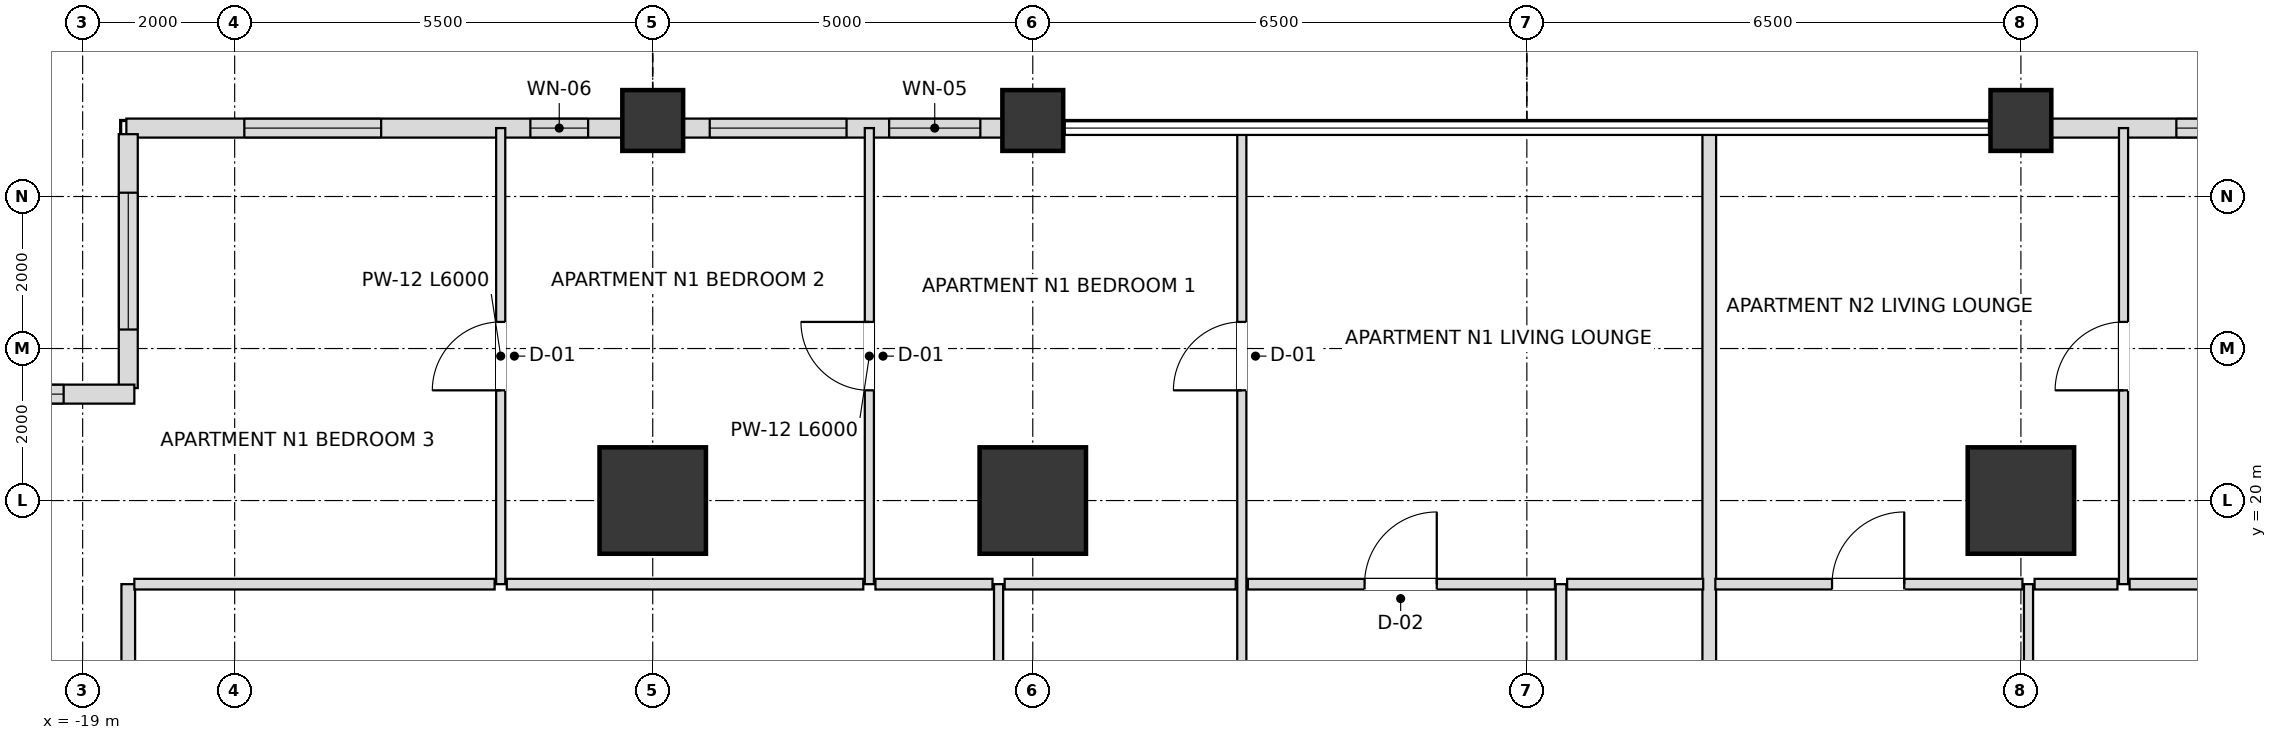
"""IFC4 building model, lengths in metres.
Left out: names, types, materials, properties, quantities, classifications, styles, units other than length and angle.
Written with IfcOpenShell. Run it as: python <this file> out.ifc"""

import sys

from ifc_helpers import new_model, si_unit, direction, frame, frame_2d, origin, origin_2d, place, context, subcontext, project, spatial, rectangle, extrude, element, fill, save


model = new_model("IFC4")
c1 = context("Model", 3, precision=1e-05, world=origin(), true_north=direction((0.0, 1.0)))
c2 = subcontext(c1, "Body", "Model", "MODEL_VIEW")
j1 = project(units=[si_unit("LENGTHUNIT", "METRE"), si_unit("PLANEANGLEUNIT", "RADIAN")], contexts=[c1])
p1 = place(None, origin())
s1 = spatial("IfcSite", under=j1, at=p1, CompositionType="ELEMENT")
p2 = place(p1, origin())
s2 = spatial("IfcBuilding", under=s1, at=p2, CompositionType="ELEMENT")
p3 = place(p2, frame((0.0, 0.0, 61.2)))
s3 = spatial("IfcBuildingStorey", under=s2, at=p3, CompositionType="ELEMENT", Elevation=61.2)
for number, where, z_axis, x_axis in (
    (1, (6.5, 20.0, 0.0), (0.0, 0.0, 1.0), (1.0, 0.0, 0.0)),
    (2, (-6.5, 20.0, 0.0), (0.0, 0.0, 1.0), (1.0, 0.0, 0.0)),
    (3, (-11.5, 20.0, 0.0), (0.0, 0.0, 1.0), (1.0, 0.0, 0.0)),
):
    element("IfcColumn", number, at=place(p3, frame(where, z_axis=z_axis, x_axis=x_axis)), inside=s3, PredefinedType="USERDEFINED", context=c2, shape_type="SweptSolid", body=[
        extrude(rectangle(XDim=1.4, YDim=1.4, at=origin_2d()), origin(), (0.0, 0.0, 1.0), 3.6),
    ])
for number, where, z_axis, x_axis in (
    (4, (-11.5, 25.0, 0.0), (0.0, 0.0, 1.0), (1.0, 0.0, 0.0)),
    (5, (-6.5, 25.0, 0.0), (0.0, 0.0, 1.0), (1.0, 0.0, 0.0)),
    (6, (6.5, 25.0, 0.0), (0.0, 0.0, 1.0), (1.0, 0.0, 0.0)),
):
    element("IfcColumn", number, at=place(p3, frame(where, z_axis=z_axis, x_axis=x_axis)), inside=s3, PredefinedType="COLUMN", context=c2, shape_type="SweptSolid", body=[
        extrude(rectangle(XDim=0.8, YDim=0.8, at=origin_2d()), origin(), (0.0, 0.0, 1.0), 3.6),
    ])
p4 = place(p3, frame((11.105, 24.9, 0.0), z_axis=(0.0, 0.0, 1.0), x_axis=(-1.0, 0.0, 0.0)))
e7 = element("IfcWall", 7, at=p4, inside=s3, PredefinedType="SOLIDWALL", context=c2, shape_type="SweptSolid", body=[
    extrude(rectangle(XDim=4.21, YDim=0.25, at=frame_2d((2.105, 0.0))), origin(), (0.0, 0.0, 1.0), 2.736),
])
p5 = place(p4, frame((0.76, 0.0, 0.72)))
e8 = element("IfcOpeningElement", 8, at=p5, cuts=e7, PredefinedType="OPENING", context=c2, shape_type="SweptSolid", body=[
    extrude(rectangle(XDim=1.8, YDim=1.68, at=frame_2d((0.9, 0.84))), frame((0.0, 0.135, 0.0), z_axis=(0.0, -1.0, 0.0), x_axis=(1.0, 0.0, 0.0)), (0.0, 0.0, 1.0), 0.27),
])
p6 = place(p3, frame((-6.895, 24.9, 0.0), z_axis=(0.0, 0.0, 1.0), x_axis=(-1.0, 0.0, 0.0)))
e9 = element("IfcWall", 9, at=p6, inside=s3, PredefinedType="SOLIDWALL", context=c2, shape_type="SweptSolid", body=[
    extrude(rectangle(XDim=4.21, YDim=0.25, at=frame_2d((2.105, 0.0))), origin(), (0.0, 0.0, 1.0), 2.736),
])
p7 = place(p6, frame((0.295, 0.0, 0.72)))
e10 = element("IfcOpeningElement", 10, at=p7, cuts=e9, PredefinedType="OPENING", context=c2, shape_type="SweptSolid", body=[
    extrude(rectangle(XDim=1.2, YDim=1.68, at=frame_2d((0.6, 0.84))), frame((0.0, 0.135, 0.0), z_axis=(0.0, -1.0, 0.0), x_axis=(1.0, 0.0, 0.0)), (0.0, 0.0, 1.0), 0.27),
])
p8 = place(p6, frame((2.055, 0.0, 0.72)))
e11 = element("IfcOpeningElement", 11, at=p8, cuts=e9, PredefinedType="OPENING", context=c2, shape_type="SweptSolid", body=[
    extrude(rectangle(XDim=1.8, YDim=1.68, at=frame_2d((0.9, 0.84))), frame((0.0, 0.135, 0.0), z_axis=(0.0, -1.0, 0.0), x_axis=(1.0, 0.0, 0.0)), (0.0, 0.0, 1.0), 0.27),
])
p9 = place(p3, frame((-11.895, 24.9, 0.0), z_axis=(0.0, 0.0, 1.0), x_axis=(-1.0, 0.0, 0.0)))
e12 = element("IfcWall", 12, at=p9, inside=s3, PredefinedType="SOLIDWALL", context=c2, shape_type="SweptSolid", body=[
    extrude(rectangle(XDim=6.53, YDim=0.25, at=frame_2d((3.265, 0.0))), origin(), (0.0, 0.0, 1.0), 2.736),
])
p10 = place(p9, frame((0.455, 0.0, 0.72)))
e13 = element("IfcOpeningElement", 13, at=p10, cuts=e12, PredefinedType="OPENING", context=c2, shape_type="SweptSolid", body=[
    extrude(rectangle(XDim=0.76, YDim=1.68, at=frame_2d((0.38, 0.84))), frame((0.0, 0.135, 0.0), z_axis=(0.0, -1.0, 0.0), x_axis=(1.0, 0.0, 0.0)), (0.0, 0.0, 1.0), 0.27),
])
p11 = place(p9, frame((3.178, 0.0, 0.72)))
e14 = element("IfcOpeningElement", 14, at=p11, cuts=e12, PredefinedType="OPENING", context=c2, shape_type="SweptSolid", body=[
    extrude(rectangle(XDim=1.8, YDim=1.68, at=frame_2d((0.9, 0.84))), frame((0.0, 0.135, 0.0), z_axis=(0.0, -1.0, 0.0), x_axis=(1.0, 0.0, 0.0)), (0.0, 0.0, 1.0), 0.27),
])
p12 = place(p3, frame((-18.4, 24.82, 0.0), z_axis=(0.0, 0.0, 1.0), x_axis=(0.0, -1.0, 0.0)))
e15 = element("IfcWall", 15, at=p12, inside=s3, PredefinedType="SOLIDWALL", context=c2, shape_type="SweptSolid", body=[
    extrude(rectangle(XDim=3.34, YDim=0.25, at=frame_2d((1.67, 0.0))), origin(), (0.0, 0.0, 1.0), 2.736),
])
p13 = place(p12, frame((0.77, 0.0, 0.72)))
e16 = element("IfcOpeningElement", 16, at=p13, cuts=e15, PredefinedType="OPENING", context=c2, shape_type="SweptSolid", body=[
    extrude(rectangle(XDim=1.8, YDim=1.68, at=frame_2d((0.9, 0.84))), frame((0.0, 0.135, 0.0), z_axis=(0.0, -1.0, 0.0), x_axis=(1.0, 0.0, 0.0)), (0.0, 0.0, 1.0), 0.27),
])
p14 = place(p3, frame((-18.32, 21.4, 0.0), z_axis=(0.0, 0.0, 1.0), x_axis=(-1.0, 0.0, 0.0)))
e17 = element("IfcWall", 17, at=p14, inside=s3, PredefinedType="SOLIDWALL", context=c2, shape_type="SweptSolid", body=[
    extrude(rectangle(XDim=3.66, YDim=0.25, at=frame_2d((1.83, 0.0))), origin(), (0.0, 0.0, 1.0), 2.736),
])
p15 = place(p14, frame((0.93, 0.0, 0.72)))
e18 = element("IfcOpeningElement", 18, at=p15, cuts=e17, PredefinedType="OPENING", context=c2, shape_type="SweptSolid", body=[
    extrude(rectangle(XDim=1.8, YDim=1.68, at=frame_2d((0.9, 0.84))), frame((0.0, 0.135, 0.0), z_axis=(0.0, -1.0, 0.0), x_axis=(1.0, 0.0, 0.0)), (0.0, 0.0, 1.0), 0.27),
])
p16 = place(p3, frame((-18.4, 9.3, 0.0), z_axis=(0.0, 0.0, 1.0), x_axis=(0.0, 1.0, 0.0)))
e19 = element("IfcWall", 19, at=p16, inside=s3, PredefinedType="PARTITIONING", context=c2, shape_type="SweptSolid", body=[
    extrude(rectangle(XDim=9.6, YDim=0.18, at=frame_2d((4.8, 0.0))), origin(), (0.0, 0.0, 1.0), 2.736),
])
p17 = place(p3, frame((-13.5, 18.9, 0.0), z_axis=(0.0, 0.0, 1.0), x_axis=(0.0, 1.0, 0.0)))
e20 = element("IfcWall", 20, at=p17, inside=s3, PredefinedType="PARTITIONING", context=c2, shape_type="SweptSolid", body=[
    extrude(rectangle(XDim=6.0, YDim=0.12, at=frame_2d((3.0, 0.0))), origin(), (0.0, 0.0, 1.0), 2.736),
])
p18 = place(p17, frame((2.55, 0.0, 0.0)))
e21 = element("IfcOpeningElement", 21, at=p18, cuts=e20, PredefinedType="OPENING", context=c2, shape_type="SweptSolid", body=[
    extrude(rectangle(XDim=0.9, YDim=2.1, at=frame_2d((0.45, 1.05))), frame((0.0, 0.07, 0.0), z_axis=(0.0, -1.0, 0.0), x_axis=(1.0, 0.0, 0.0)), (0.0, 0.0, 1.0), 0.14),
])
p19 = place(p3, frame((-8.65, 18.9, 0.0), z_axis=(0.0, 0.0, 1.0), x_axis=(0.0, 1.0, 0.0)))
e22 = element("IfcWall", 22, at=p19, inside=s3, PredefinedType="PARTITIONING", context=c2, shape_type="SweptSolid", body=[
    extrude(rectangle(XDim=6.0, YDim=0.12, at=frame_2d((3.0, 0.0))), origin(), (0.0, 0.0, 1.0), 2.816),
])
p20 = place(p19, frame((2.55, 0.0, 0.0)))
e23 = element("IfcOpeningElement", 23, at=p20, cuts=e22, PredefinedType="OPENING", context=c2, shape_type="SweptSolid", body=[
    extrude(rectangle(XDim=0.9, YDim=2.1, at=frame_2d((0.45, 1.05))), frame((0.0, 0.07, 0.0), z_axis=(0.0, -1.0, 0.0), x_axis=(1.0, 0.0, 0.0)), (0.0, 0.0, 1.0), 0.14),
])
p21 = place(p3, frame((-6.95, 9.3, 0.0), z_axis=(0.0, 0.0, 1.0), x_axis=(0.0, 1.0, 0.0)))
e24 = element("IfcWall", 24, at=p21, inside=s3, PredefinedType="PARTITIONING", context=c2, shape_type="SweptSolid", body=[
    extrude(rectangle(XDim=9.6, YDim=0.12, at=frame_2d((4.8, 0.0))), origin(), (0.0, 0.0, 1.0), 2.816),
])
p22 = place(p21, frame((4.35, 0.0, 0.0)))
e25 = element("IfcOpeningElement", 25, at=p22, cuts=e24, PredefinedType="OPENING", context=c2, shape_type="SweptSolid", body=[
    extrude(rectangle(XDim=0.9, YDim=2.1, at=frame_2d((0.45, 1.05))), frame((0.0, 0.07, 0.0), z_axis=(0.0, -1.0, 0.0), x_axis=(1.0, 0.0, 0.0)), (0.0, 0.0, 1.0), 0.14),
])
p23 = place(p3, frame((-3.75, 9.3, 0.0), z_axis=(0.0, 0.0, 1.0), x_axis=(0.0, 1.0, 0.0)))
e26 = element("IfcWall", 26, at=p23, inside=s3, PredefinedType="PARTITIONING", context=c2, shape_type="SweptSolid", body=[
    extrude(rectangle(XDim=15.6, YDim=0.12, at=frame_2d((7.8, 0.0))), origin(), (0.0, 0.0, 1.0), 2.816),
])
p24 = place(p23, frame((4.325, 0.0, 0.0)))
e27 = element("IfcOpeningElement", 27, at=p24, cuts=e26, PredefinedType="OPENING", context=c2, shape_type="SweptSolid", body=[
    extrude(rectangle(XDim=0.95, YDim=2.1, at=frame_2d((0.475, 1.05))), frame((0.0, 0.07, 0.0), z_axis=(0.0, -1.0, 0.0), x_axis=(1.0, 0.0, 0.0)), (0.0, 0.0, 1.0), 0.14),
])
p25 = place(p23, frame((12.15, 0.0, 0.0)))
e28 = element("IfcOpeningElement", 28, at=p25, cuts=e26, PredefinedType="OPENING", context=c2, shape_type="SweptSolid", body=[
    extrude(rectangle(XDim=0.9, YDim=2.1, at=frame_2d((0.45, 1.05))), frame((0.0, 0.07, 0.0), z_axis=(0.0, -1.0, 0.0), x_axis=(1.0, 0.0, 0.0)), (0.0, 0.0, 1.0), 0.14),
])
p26 = place(p3, frame((0.45, 9.3, 0.0), z_axis=(0.0, 0.0, 1.0), x_axis=(0.0, 1.0, 0.0)))
e29 = element("IfcWall", 29, at=p26, inside=s3, PredefinedType="PARTITIONING", context=c2, shape_type="SweptSolid", body=[
    extrude(rectangle(XDim=9.6, YDim=0.14, at=frame_2d((4.8, 0.0))), origin(), (0.0, 0.0, 1.0), 2.948),
])
p27 = place(p26, frame((4.35, 0.0, 0.0)))
e30 = element("IfcOpeningElement", 30, at=p27, cuts=e29, PredefinedType="OPENING", context=c2, shape_type="SweptSolid", body=[
    extrude(rectangle(XDim=0.9, YDim=2.1, at=frame_2d((0.45, 1.05))), frame((0.0, 0.08, 0.0), z_axis=(0.0, -1.0, 0.0), x_axis=(1.0, 0.0, 0.0)), (0.0, 0.0, 1.0), 0.16),
])
p28 = place(p3, frame((2.4, 9.3, 0.0), z_axis=(0.0, 0.0, 1.0), x_axis=(0.0, 1.0, 0.0)))
e31 = element("IfcWall", 31, at=p28, inside=s3, PredefinedType="PARTITIONING", context=c2, shape_type="SweptSolid", body=[
    extrude(rectangle(XDim=15.6, YDim=0.18, at=frame_2d((7.8, 0.0))), origin(), (0.0, 0.0, 1.0), 2.816),
])
p29 = place(p3, frame((6.6, 9.3, 0.0), z_axis=(0.0, 0.0, 1.0), x_axis=(0.0, 1.0, 0.0)))
e32 = element("IfcWall", 32, at=p29, inside=s3, PredefinedType="PARTITIONING", context=c2, shape_type="SweptSolid", body=[
    extrude(rectangle(XDim=9.6, YDim=0.12, at=frame_2d((4.8, 0.0))), origin(), (0.0, 0.0, 1.0), 2.816),
])
p30 = place(p29, frame((4.325, 0.0, 0.0)))
e33 = element("IfcOpeningElement", 33, at=p30, cuts=e32, PredefinedType="OPENING", context=c2, shape_type="SweptSolid", body=[
    extrude(rectangle(XDim=0.95, YDim=2.1, at=frame_2d((0.475, 1.05))), frame((0.0, 0.07, 0.0), z_axis=(0.0, -1.0, 0.0), x_axis=(1.0, 0.0, 0.0)), (0.0, 0.0, 1.0), 0.14),
])
p31 = place(p3, frame((7.85, 18.9, 0.0), z_axis=(0.0, 0.0, 1.0), x_axis=(0.0, 1.0, 0.0)))
e34 = element("IfcWall", 34, at=p31, inside=s3, PredefinedType="PARTITIONING", context=c2, shape_type="SweptSolid", body=[
    extrude(rectangle(XDim=6.0, YDim=0.12, at=frame_2d((3.0, 0.0))), origin(), (0.0, 0.0, 1.0), 2.816),
])
p32 = place(p31, frame((2.55, 0.0, 0.0)))
e35 = element("IfcOpeningElement", 35, at=p32, cuts=e34, PredefinedType="OPENING", context=c2, shape_type="SweptSolid", body=[
    extrude(rectangle(XDim=0.9, YDim=2.1, at=frame_2d((0.45, 1.05))), frame((0.0, 0.07, 0.0), z_axis=(0.0, -1.0, 0.0), x_axis=(1.0, 0.0, 0.0)), (0.0, 0.0, 1.0), 0.14),
])
p33 = place(p3, frame((-18.32, 18.9, 0.0), z_axis=(0.0, 0.0, 1.0), x_axis=(1.0, 0.0, 0.0)))
e36 = element("IfcWall", 36, at=p33, inside=s3, PredefinedType="PARTITIONING", context=c2, shape_type="SweptSolid", body=[
    extrude(rectangle(XDim=4.74, YDim=0.14, at=frame_2d((2.37, 0.0))), origin(), (0.0, 0.0, 1.0), 2.736),
])
p34 = place(p3, frame((-13.42, 18.9, 0.0), z_axis=(0.0, 0.0, 1.0), x_axis=(1.0, 0.0, 0.0)))
e37 = element("IfcWall", 37, at=p34, inside=s3, PredefinedType="PARTITIONING", context=c2, shape_type="SweptSolid", body=[
    extrude(rectangle(XDim=4.69, YDim=0.14, at=frame_2d((2.345, 0.0))), origin(), (0.0, 0.0, 1.0), 2.736),
])
p35 = place(p3, frame((-8.57, 18.9, 0.0), z_axis=(0.0, 0.0, 1.0), x_axis=(1.0, 0.0, 0.0)))
e38 = element("IfcWall", 38, at=p35, inside=s3, PredefinedType="PARTITIONING", context=c2, shape_type="SweptSolid", body=[
    extrude(rectangle(XDim=1.54, YDim=0.14, at=frame_2d((0.77, 0.0))), origin(), (0.0, 0.0, 1.0), 3.38),
])
p36 = place(p3, frame((-6.87, 18.9, 0.0), z_axis=(0.0, 0.0, 1.0), x_axis=(1.0, 0.0, 0.0)))
e39 = element("IfcWall", 39, at=p36, inside=s3, PredefinedType="PARTITIONING", context=c2, shape_type="SweptSolid", body=[
    extrude(rectangle(XDim=3.04, YDim=0.14, at=frame_2d((1.52, 0.0))), origin(), (0.0, 0.0, 1.0), 2.816),
])
p37 = place(p3, frame((-3.67, 18.9, 0.0), z_axis=(0.0, 0.0, 1.0), x_axis=(1.0, 0.0, 0.0)))
e40 = element("IfcWall", 40, at=p37, inside=s3, PredefinedType="PARTITIONING", context=c2, shape_type="SweptSolid", body=[
    extrude(rectangle(XDim=4.04, YDim=0.14, at=frame_2d((2.02, 0.0))), origin(), (0.0, 0.0, 1.0), 3.38),
])
p38 = place(p37, frame((1.535, 0.0, 0.0)))
e41 = element("IfcOpeningElement", 41, at=p38, cuts=e40, PredefinedType="OPENING", context=c2, shape_type="SweptSolid", body=[
    extrude(rectangle(XDim=0.95, YDim=2.1, at=frame_2d((0.475, 1.05))), frame((0.0, 0.08, 0.0), z_axis=(0.0, -1.0, 0.0), x_axis=(1.0, 0.0, 0.0)), (0.0, 0.0, 1.0), 0.16),
])
p39 = place(p3, frame((0.53, 18.9, 0.0), z_axis=(0.0, 0.0, 1.0), x_axis=(1.0, 0.0, 0.0)))
e42 = element("IfcWall", 42, at=p39, inside=s3, PredefinedType="PARTITIONING", context=c2, shape_type="SweptSolid", body=[
    extrude(rectangle(XDim=1.79, YDim=0.14, at=frame_2d((0.895, 0.0))), origin(), (0.0, 0.0, 1.0), 3.38),
])
p40 = place(p3, frame((2.48, 18.9, 0.0), z_axis=(0.0, 0.0, 1.0), x_axis=(1.0, 0.0, 0.0)))
e43 = element("IfcWall", 43, at=p40, inside=s3, PredefinedType="PARTITIONING", context=c2, shape_type="SweptSolid", body=[
    extrude(rectangle(XDim=4.04, YDim=0.14, at=frame_2d((2.02, 0.0))), origin(), (0.0, 0.0, 1.0), 3.38),
])
p41 = place(p40, frame((1.535, 0.0, 0.0)))
e44 = element("IfcOpeningElement", 44, at=p41, cuts=e43, PredefinedType="OPENING", context=c2, shape_type="SweptSolid", body=[
    extrude(rectangle(XDim=0.95, YDim=2.1, at=frame_2d((0.475, 1.05))), frame((0.0, 0.08, 0.0), z_axis=(0.0, -1.0, 0.0), x_axis=(1.0, 0.0, 0.0)), (0.0, 0.0, 1.0), 0.16),
])
p42 = place(p3, frame((6.68, 18.9, 0.0), z_axis=(0.0, 0.0, 1.0), x_axis=(1.0, 0.0, 0.0)))
e45 = element("IfcWall", 45, at=p42, inside=s3, PredefinedType="PARTITIONING", context=c2, shape_type="SweptSolid", body=[
    extrude(rectangle(XDim=1.09, YDim=0.14, at=frame_2d((0.545, 0.0))), origin(), (0.0, 0.0, 1.0), 3.38),
])
p43 = place(p3, frame((7.93, 18.9, 0.0), z_axis=(0.0, 0.0, 1.0), x_axis=(1.0, 0.0, 0.0)))
e46 = element("IfcWall", 46, at=p43, inside=s3, PredefinedType="PARTITIONING", context=c2, shape_type="SweptSolid", body=[
    extrude(rectangle(XDim=1.79, YDim=0.14, at=frame_2d((0.895, 0.0))), origin(), (0.0, 0.0, 1.0), 3.38),
])
p44 = place(p5, origin())
e47 = element("IfcWindow", 47, at=p44, inside=s3, PartitioningType="SINGLE_PANEL", PredefinedType="WINDOW", context=c2, shape_type="SweptSolid", body=[
    extrude(rectangle(XDim=1.8, YDim=1.68, at=frame_2d((0.9, 0.84))), frame((0.0, 0.03, 0.0), z_axis=(0.0, -1.0, 0.0), x_axis=(1.0, 0.0, 0.0)), (0.0, 0.0, 1.0), 0.06),
])
fill(e8, e47)
p45 = place(p7, origin())
e48 = element("IfcWindow", 48, at=p45, inside=s3, PartitioningType="SINGLE_PANEL", PredefinedType="WINDOW", context=c2, shape_type="SweptSolid", body=[
    extrude(rectangle(XDim=1.2, YDim=1.68, at=frame_2d((0.6, 0.84))), frame((0.0, 0.03, 0.0), z_axis=(0.0, -1.0, 0.0), x_axis=(1.0, 0.0, 0.0)), (0.0, 0.0, 1.0), 0.06),
])
fill(e10, e48)
p46 = place(p8, origin())
e49 = element("IfcWindow", 49, at=p46, inside=s3, PartitioningType="SINGLE_PANEL", PredefinedType="WINDOW", context=c2, shape_type="SweptSolid", body=[
    extrude(rectangle(XDim=1.8, YDim=1.68, at=frame_2d((0.9, 0.84))), frame((0.0, 0.03, 0.0), z_axis=(0.0, -1.0, 0.0), x_axis=(1.0, 0.0, 0.0)), (0.0, 0.0, 1.0), 0.06),
])
fill(e11, e49)
p47 = place(p10, origin())
e50 = element("IfcWindow", 50, at=p47, inside=s3, PartitioningType="SINGLE_PANEL", PredefinedType="WINDOW", context=c2, shape_type="SweptSolid", body=[
    extrude(rectangle(XDim=0.76, YDim=1.68, at=frame_2d((0.38, 0.84))), frame((0.0, 0.03, 0.0), z_axis=(0.0, -1.0, 0.0), x_axis=(1.0, 0.0, 0.0)), (0.0, 0.0, 1.0), 0.06),
])
fill(e13, e50)
p48 = place(p11, origin())
e51 = element("IfcWindow", 51, at=p48, inside=s3, PartitioningType="SINGLE_PANEL", PredefinedType="WINDOW", context=c2, shape_type="SweptSolid", body=[
    extrude(rectangle(XDim=1.8, YDim=1.68, at=frame_2d((0.9, 0.84))), frame((0.0, 0.03, 0.0), z_axis=(0.0, -1.0, 0.0), x_axis=(1.0, 0.0, 0.0)), (0.0, 0.0, 1.0), 0.06),
])
fill(e14, e51)
p49 = place(p13, origin())
e52 = element("IfcWindow", 52, at=p49, inside=s3, PartitioningType="SINGLE_PANEL", PredefinedType="WINDOW", context=c2, shape_type="SweptSolid", body=[
    extrude(rectangle(XDim=1.8, YDim=1.68, at=frame_2d((0.9, 0.84))), frame((0.0, 0.03, 0.0), z_axis=(0.0, -1.0, 0.0), x_axis=(1.0, 0.0, 0.0)), (0.0, 0.0, 1.0), 0.06),
])
fill(e16, e52)
p50 = place(p15, origin())
e53 = element("IfcWindow", 53, at=p50, inside=s3, PartitioningType="SINGLE_PANEL", PredefinedType="WINDOW", context=c2, shape_type="SweptSolid", body=[
    extrude(rectangle(XDim=1.8, YDim=1.68, at=frame_2d((0.9, 0.84))), frame((0.0, 0.03, 0.0), z_axis=(0.0, -1.0, 0.0), x_axis=(1.0, 0.0, 0.0)), (0.0, 0.0, 1.0), 0.06),
])
fill(e18, e53)
p51 = place(p38, origin())
e54 = element("IfcDoor", 54, at=p51, inside=s3, OperationType="SINGLE_SWING_RIGHT", PredefinedType="DOOR", context=c2, shape_type="SweptSolid", body=[
    extrude(rectangle(XDim=0.95, YDim=2.1, at=frame_2d((0.475, 1.05))), frame((0.0, 0.025, 0.0), z_axis=(0.0, -1.0, 0.0), x_axis=(1.0, 0.0, 0.0)), (0.0, 0.0, 1.0), 0.05),
])
fill(e41, e54)
p52 = place(p25, origin())
e55 = element("IfcDoor", 55, at=p52, inside=s3, OperationType="SINGLE_SWING_LEFT", PredefinedType="DOOR", context=c2, shape_type="SweptSolid", body=[
    extrude(rectangle(XDim=0.9, YDim=2.1, at=frame_2d((0.45, 1.05))), frame((0.0, 0.025, 0.0), z_axis=(0.0, -1.0, 0.0), x_axis=(1.0, 0.0, 0.0)), (0.0, 0.0, 1.0), 0.05),
])
fill(e28, e55)
p53 = place(p20, origin())
e56 = element("IfcDoor", 56, at=p53, inside=s3, OperationType="SINGLE_SWING_RIGHT", PredefinedType="DOOR", context=c2, shape_type="SweptSolid", body=[
    extrude(rectangle(XDim=0.9, YDim=2.1, at=frame_2d((0.45, 1.05))), frame((0.0, 0.025, 0.0), z_axis=(0.0, -1.0, 0.0), x_axis=(1.0, 0.0, 0.0)), (0.0, 0.0, 1.0), 0.05),
])
fill(e23, e56)
p54 = place(p18, origin())
e57 = element("IfcDoor", 57, at=p54, inside=s3, OperationType="SINGLE_SWING_LEFT", PredefinedType="DOOR", context=c2, shape_type="SweptSolid", body=[
    extrude(rectangle(XDim=0.9, YDim=2.1, at=frame_2d((0.45, 1.05))), frame((0.0, 0.025, 0.0), z_axis=(0.0, -1.0, 0.0), x_axis=(1.0, 0.0, 0.0)), (0.0, 0.0, 1.0), 0.05),
])
fill(e21, e57)
p55 = place(p41, origin())
e58 = element("IfcDoor", 58, at=p55, inside=s3, OperationType="SINGLE_SWING_RIGHT", PredefinedType="DOOR", context=c2, shape_type="SweptSolid", body=[
    extrude(rectangle(XDim=0.95, YDim=2.1, at=frame_2d((0.475, 1.05))), frame((0.0, 0.025, 0.0), z_axis=(0.0, -1.0, 0.0), x_axis=(1.0, 0.0, 0.0)), (0.0, 0.0, 1.0), 0.05),
])
fill(e44, e58)
p56 = place(p32, origin())
e59 = element("IfcDoor", 59, at=p56, inside=s3, OperationType="SINGLE_SWING_LEFT", PredefinedType="DOOR", context=c2, shape_type="SweptSolid", body=[
    extrude(rectangle(XDim=0.9, YDim=2.1, at=frame_2d((0.45, 1.05))), frame((0.0, 0.025, 0.0), z_axis=(0.0, -1.0, 0.0), x_axis=(1.0, 0.0, 0.0)), (0.0, 0.0, 1.0), 0.05),
])
fill(e35, e59)
save(model, sys.argv[1])
